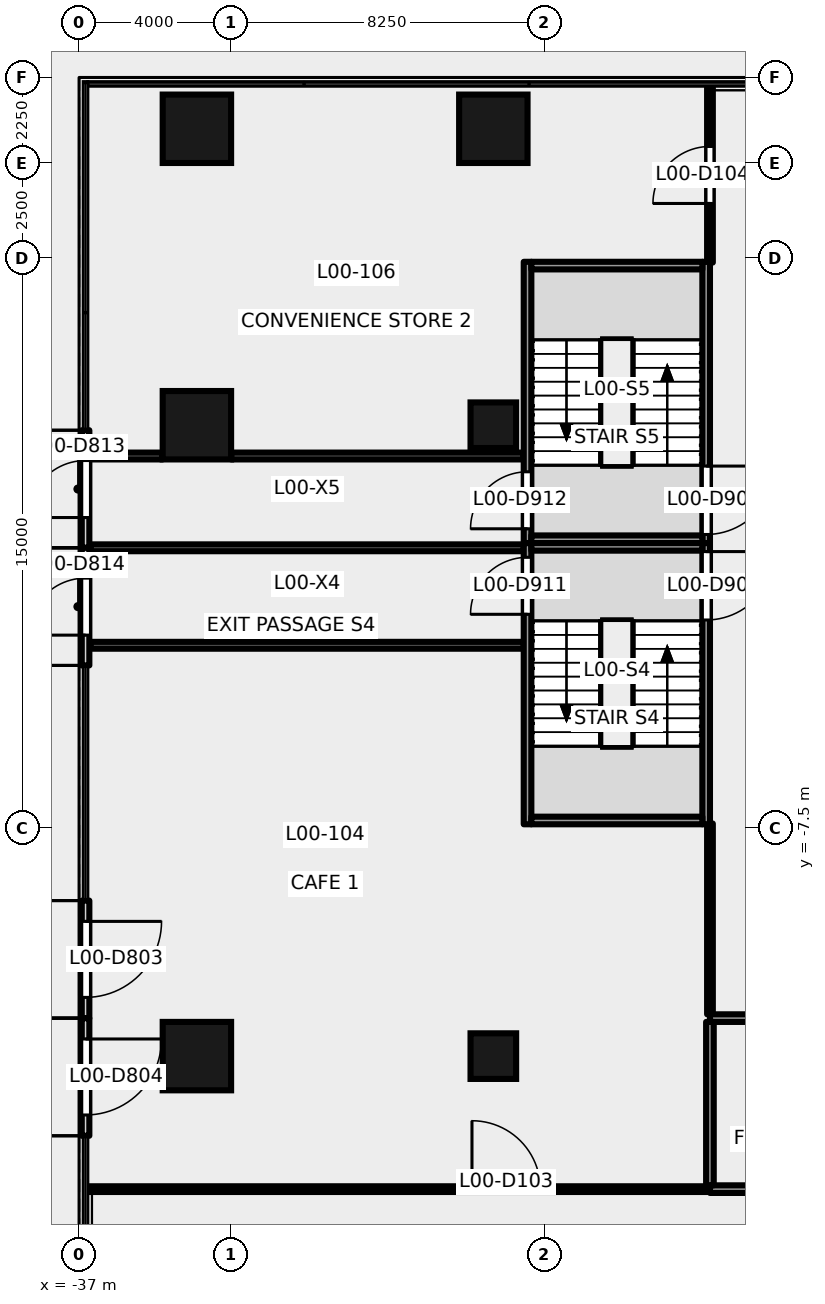
"""IFC4 building model, lengths in metres.
Left out: names, types, materials, properties, quantities, classifications, styles, units other than length and angle.
Written with IfcOpenShell. Run it as: python <this file> out.ifc"""

import sys

from ifc_helpers import new_model, si_unit, direction, frame, frame_2d, origin, origin_2d, place, context, subcontext, project, spatial, rectangle, extrude, element, fill, save


model = new_model("IFC4")
c1 = context("Model", 3, precision=1e-05, world=origin(), true_north=direction((0.0, 1.0)))
c2 = subcontext(c1, "Body", "Model", "MODEL_VIEW")
j1 = project(units=[si_unit("LENGTHUNIT", "METRE"), si_unit("PLANEANGLEUNIT", "RADIAN")], contexts=[c1])
p1 = place(None, origin())
s1 = spatial("IfcSite", under=j1, at=p1, CompositionType="ELEMENT")
p2 = place(p1, origin())
s2 = spatial("IfcBuilding", under=s1, at=p2, CompositionType="ELEMENT")
p3 = place(p2, origin())
s3 = spatial("IfcBuildingStorey", under=s2, at=p3, CompositionType="ELEMENT", Elevation=0.0)
for number, where, z_axis, x_axis in (
    (1, (-33.9, 10.9, -0.2), (0.0, 0.0, 1.0), (1.0, 0.0, 0.0)),
    (2, (-33.9, -13.5, -0.2), (0.0, 0.0, 1.0), (0.0, 1.0, 0.0)),
    (3, (-33.9, 3.1, -0.2), (0.0, 0.0, 1.0), (0.0, 1.0, 0.0)),
    (4, (-26.1, 10.9, -0.2), (0.0, 0.0, 1.0), (1.0, 0.0, 0.0)),
):
    element("IfcColumn", number, at=place(p3, frame(where, z_axis=z_axis, x_axis=x_axis)), inside=s3, PredefinedType="COLUMN", context=c2, shape_type="SweptSolid", body=[
        extrude(rectangle(XDim=1.8, YDim=1.8, at=origin_2d()), origin(), (0.0, 0.0, 1.0), 7.2),
    ])
for number, where, z_axis, x_axis in (
    (5, (-26.1, -13.5, -0.2), (0.0, 0.0, 1.0), (1.0, 0.0, 0.0)),
    (6, (-26.1, 3.1, -0.2), (0.0, 0.0, 1.0), (1.0, 0.0, 0.0)),
):
    element("IfcColumn", number, at=place(p3, frame(where, z_axis=z_axis, x_axis=x_axis)), inside=s3, PredefinedType="COLUMN", context=c2, shape_type="SweptSolid", body=[
        extrude(rectangle(XDim=1.2, YDim=1.2, at=origin_2d()), origin(), (0.0, 0.0, 1.0), 7.2),
    ])
p4 = place(p3, frame((-36.83, -0.126, 0.0), z_axis=(0.0, 0.0, 1.0), x_axis=(0.0, 1.0, 0.0)))
e7 = element("IfcWall", 7, at=p4, inside=s3, PredefinedType="SOLIDWALL", context=c2, shape_type="SweptSolid", body=[
    extrude(rectangle(XDim=3.094, YDim=0.2, at=frame_2d((1.547, 0.0))), origin(), (0.0, 0.0, 1.0), 7.0),
])
p5 = place(p4, frame((0.797, 0.0, 0.0)))
e8 = element("IfcOpeningElement", 8, at=p5, cuts=e7, PredefinedType="OPENING", context=c2, shape_type="SweptSolid", body=[
    extrude(rectangle(XDim=1.5, YDim=2.4, at=frame_2d((0.75, 1.2))), frame((0.0, 0.111, 0.0), z_axis=(0.0, -1.0, 0.0), x_axis=(1.0, 0.0, 0.0)), (0.0, 0.0, 1.0), 0.221),
])
p6 = place(p3, frame((-36.83, -3.22, 0.0), z_axis=(0.0, 0.0, 1.0), x_axis=(0.0, 1.0, 0.0)))
e9 = element("IfcWall", 9, at=p6, inside=s3, PredefinedType="SOLIDWALL", context=c2, shape_type="SweptSolid", body=[
    extrude(rectangle(XDim=3.094, YDim=0.2, at=frame_2d((1.547, 0.0))), origin(), (0.0, 0.0, 1.0), 7.0),
])
p7 = place(p6, frame((0.797, 0.0, 0.0)))
e10 = element("IfcOpeningElement", 10, at=p7, cuts=e9, PredefinedType="OPENING", context=c2, shape_type="SweptSolid", body=[
    extrude(rectangle(XDim=1.5, YDim=2.4, at=frame_2d((0.75, 1.2))), frame((0.0, 0.111, 0.0), z_axis=(0.0, -1.0, 0.0), x_axis=(1.0, 0.0, 0.0)), (0.0, 0.0, 1.0), 0.221),
])
p8 = place(p3, frame((-36.83, -9.408, 0.0), z_axis=(0.0, 0.0, 1.0), x_axis=(0.0, -1.0, 0.0)))
e11 = element("IfcWall", 11, at=p8, inside=s3, PredefinedType="SOLIDWALL", context=c2, shape_type="SweptSolid", body=[
    extrude(rectangle(XDim=3.094, YDim=0.2, at=frame_2d((1.547, 0.0))), origin(), (0.0, 0.0, 1.0), 7.0),
])
p9 = place(p8, frame((0.547, 0.0, 0.0)))
e12 = element("IfcOpeningElement", 12, at=p9, cuts=e11, PredefinedType="OPENING", context=c2, shape_type="SweptSolid", body=[
    extrude(rectangle(XDim=2.0, YDim=2.4, at=frame_2d((1.0, 1.2))), frame((0.0, 0.111, 0.0), z_axis=(0.0, -1.0, 0.0), x_axis=(1.0, 0.0, 0.0)), (0.0, 0.0, 1.0), 0.221),
])
p10 = place(p3, frame((-36.83, -12.502, 0.0), z_axis=(0.0, 0.0, 1.0), x_axis=(0.0, -1.0, 0.0)))
e13 = element("IfcWall", 13, at=p10, inside=s3, PredefinedType="SOLIDWALL", context=c2, shape_type="SweptSolid", body=[
    extrude(rectangle(XDim=3.094, YDim=0.2, at=frame_2d((1.547, 0.0))), origin(), (0.0, 0.0, 1.0), 7.0),
])
p11 = place(p10, frame((0.547, 0.0, 0.0)))
e14 = element("IfcOpeningElement", 14, at=p11, cuts=e13, PredefinedType="OPENING", context=c2, shape_type="SweptSolid", body=[
    extrude(rectangle(XDim=2.0, YDim=2.4, at=frame_2d((1.0, 1.2))), frame((0.0, 0.111, 0.0), z_axis=(0.0, -1.0, 0.0), x_axis=(1.0, 0.0, 0.0)), (0.0, 0.0, 1.0), 0.221),
])
p12 = place(p3, frame((-20.5, 0.0, -0.2), z_axis=(0.0, 0.0, 1.0), x_axis=(0.0, -1.0, 0.0)))
e15 = element("IfcWall", 15, at=p12, inside=s3, PredefinedType="SHEAR", context=c2, shape_type="SweptSolid", body=[
    extrude(rectangle(XDim=7.4, YDim=0.2, at=frame_2d((3.7, 0.0))), origin(), (0.0, 0.0, 1.0), 7.2),
])
p13 = place(p12, frame((0.225, 0.0, 0.2)))
e16 = element("IfcOpeningElement", 16, at=p13, cuts=e15, PredefinedType="OPENING", context=c2, shape_type="SweptSolid", body=[
    extrude(rectangle(XDim=1.8, YDim=2.1, at=frame_2d((0.9, 1.05))), frame((0.0, 0.111, 0.0), z_axis=(0.0, -1.0, 0.0), x_axis=(1.0, 0.0, 0.0)), (0.0, 0.0, 1.0), 0.221),
])
p14 = place(p3, frame((-25.2, -7.4, -0.2), z_axis=(0.0, 0.0, 1.0), x_axis=(0.0, 1.0, 0.0)))
e17 = element("IfcWall", 17, at=p14, inside=s3, PredefinedType="SHEAR", context=c2, shape_type="SweptSolid", body=[
    extrude(rectangle(XDim=7.4, YDim=0.2, at=frame_2d((3.7, 0.0))), origin(), (0.0, 0.0, 1.0), 7.2),
])
p15 = place(p14, frame((5.525, 0.0, 0.2)))
e18 = element("IfcOpeningElement", 18, at=p15, cuts=e17, PredefinedType="OPENING", context=c2, shape_type="SweptSolid", body=[
    extrude(rectangle(XDim=1.5, YDim=2.1, at=frame_2d((0.75, 1.05))), frame((0.0, 0.111, 0.0), z_axis=(0.0, -1.0, 0.0), x_axis=(1.0, 0.0, 0.0)), (0.0, 0.0, 1.0), 0.221),
])
for number, where, z_axis, x_axis in (
    (19, (-25.1, -0.1, -0.2), (0.0, 0.0, 1.0), (1.0, 0.0, 0.0)),
    (20, (-25.1, -7.3, -0.2), (0.0, 0.0, 1.0), (1.0, 0.0, 0.0)),
):
    element("IfcWall", number, at=place(p3, frame(where, z_axis=z_axis, x_axis=x_axis)), inside=s3, PredefinedType="SHEAR", context=c2, shape_type="SweptSolid", body=[
        extrude(rectangle(XDim=4.5, YDim=0.2, at=frame_2d((2.25, 0.0))), origin(), (0.0, 0.0, 1.0), 7.2),
    ])
p16 = place(p3, frame((-20.5, 7.4, -0.2), z_axis=(0.0, 0.0, 1.0), x_axis=(0.0, -1.0, 0.0)))
e21 = element("IfcWall", 21, at=p16, inside=s3, PredefinedType="SHEAR", context=c2, shape_type="SweptSolid", body=[
    extrude(rectangle(XDim=7.4, YDim=0.2, at=frame_2d((3.7, 0.0))), origin(), (0.0, 0.0, 1.0), 7.2),
])
p17 = place(p16, frame((5.375, 0.0, 0.2)))
e22 = element("IfcOpeningElement", 22, at=p17, cuts=e21, PredefinedType="OPENING", context=c2, shape_type="SweptSolid", body=[
    extrude(rectangle(XDim=1.8, YDim=2.1, at=frame_2d((0.9, 1.05))), frame((0.0, 0.111, 0.0), z_axis=(0.0, -1.0, 0.0), x_axis=(1.0, 0.0, 0.0)), (0.0, 0.0, 1.0), 0.221),
])
p18 = place(p3, frame((-25.2, 0.0, -0.2), z_axis=(0.0, 0.0, 1.0), x_axis=(0.0, 1.0, 0.0)))
e23 = element("IfcWall", 23, at=p18, inside=s3, PredefinedType="SHEAR", context=c2, shape_type="SweptSolid", body=[
    extrude(rectangle(XDim=7.4, YDim=0.2, at=frame_2d((3.7, 0.0))), origin(), (0.0, 0.0, 1.0), 7.2),
])
p19 = place(p18, frame((0.375, 0.0, 0.2)))
e24 = element("IfcOpeningElement", 24, at=p19, cuts=e23, PredefinedType="OPENING", context=c2, shape_type="SweptSolid", body=[
    extrude(rectangle(XDim=1.5, YDim=2.1, at=frame_2d((0.75, 1.05))), frame((0.0, 0.111, 0.0), z_axis=(0.0, -1.0, 0.0), x_axis=(1.0, 0.0, 0.0)), (0.0, 0.0, 1.0), 0.221),
])
for number, where, z_axis, x_axis in (
    (25, (-25.1, 7.3, -0.2), (0.0, 0.0, 1.0), (1.0, 0.0, 0.0)),
    (26, (-25.1, 0.1, -0.2), (0.0, 0.0, 1.0), (1.0, 0.0, 0.0)),
):
    element("IfcWall", number, at=place(p3, frame(where, z_axis=z_axis, x_axis=x_axis)), inside=s3, PredefinedType="SHEAR", context=c2, shape_type="SweptSolid", body=[
        extrude(rectangle(XDim=4.5, YDim=0.2, at=frame_2d((2.25, 0.0))), origin(), (0.0, 0.0, 1.0), 7.2),
    ])
for number, where, z_axis, x_axis in (
    (27, (-36.7, -2.69, 0.0), (0.0, 0.0, 1.0), (1.0, 0.0, 0.0)),
    (28, (-36.7, -0.125, 0.0), (0.0, 0.0, 1.0), (1.0, 0.0, 0.0)),
):
    element("IfcWall", number, at=place(p3, frame(where, z_axis=z_axis, x_axis=x_axis)), inside=s3, PredefinedType="PARTITIONING", context=c2, shape_type="SweptSolid", body=[
        extrude(rectangle(XDim=11.4, YDim=0.18, at=frame_2d((5.7, 0.0))), origin(), (0.0, 0.0, 1.0), 7.0),
    ])
p20 = place(p3, frame((-36.7, 2.29, 0.0), z_axis=(0.0, 0.0, 1.0), x_axis=(1.0, 0.0, 0.0)))
e29 = element("IfcWall", 29, at=p20, inside=s3, PredefinedType="PARTITIONING", context=c2, shape_type="SweptSolid", body=[
    extrude(rectangle(XDim=1.9, YDim=0.18, at=frame_2d((0.95, 0.0))), origin(), (0.0, 0.0, 1.0), 7.0),
])
p21 = place(p3, frame((-33.0, 2.29, 0.0), z_axis=(0.0, 0.0, 1.0), x_axis=(1.0, 0.0, 0.0)))
e30 = element("IfcWall", 30, at=p21, inside=s3, PredefinedType="PARTITIONING", context=c2, shape_type="SweptSolid", body=[
    extrude(rectangle(XDim=7.7, YDim=0.18, at=frame_2d((3.85, 0.0))), origin(), (0.0, 0.0, 1.0), 7.0),
])
p22 = place(p3, frame((-15.4, -12.5, 0.0), z_axis=(0.0, 0.0, 1.0), x_axis=(-1.0, 0.0, 0.0)))
e31 = element("IfcWall", 31, at=p22, inside=s3, PredefinedType="PARTITIONING", context=c2, shape_type="SweptSolid", body=[
    extrude(rectangle(XDim=5.0, YDim=0.2, at=frame_2d((2.5, 0.0))), origin(), (0.0, 0.0, 1.0), 6.7),
])
p23 = place(p22, frame((2.05, 0.0, 0.0)))
e32 = element("IfcOpeningElement", 32, at=p23, cuts=e31, PredefinedType="OPENING", context=c2, shape_type="SweptSolid", body=[
    extrude(rectangle(XDim=0.9, YDim=2.1, at=frame_2d((0.45, 1.05))), frame((0.0, 0.111, 0.0), z_axis=(0.0, -1.0, 0.0), x_axis=(1.0, 0.0, 0.0)), (0.0, 0.0, 1.0), 0.221),
])
p24 = place(p3, frame((-20.4, -12.4, 0.0), z_axis=(0.0, 0.0, 1.0), x_axis=(0.0, 1.0, 0.0)))
e33 = element("IfcWall", 33, at=p24, inside=s3, PredefinedType="PARTITIONING", context=c2, shape_type="SweptSolid", body=[
    extrude(rectangle(XDim=5.02, YDim=0.15, at=frame_2d((2.51, 0.0))), origin(), (0.0, 0.0, 1.0), 7.0),
])
p25 = place(p3, frame((-20.4, 7.38, 0.0), z_axis=(0.0, 0.0, 1.0), x_axis=(0.0, 1.0, 0.0)))
e34 = element("IfcWall", 34, at=p25, inside=s3, PredefinedType="PARTITIONING", context=c2, shape_type="SweptSolid", body=[
    extrude(rectangle(XDim=4.61, YDim=0.15, at=frame_2d((2.305, 0.0))), origin(), (0.0, 0.0, 1.0), 6.0),
])
p26 = place(p25, frame((1.555, 0.0, 0.0)))
e35 = element("IfcOpeningElement", 35, at=p26, cuts=e34, PredefinedType="OPENING", context=c2, shape_type="SweptSolid", body=[
    extrude(rectangle(XDim=1.5, YDim=2.1, at=frame_2d((0.75, 1.05))), frame((0.0, 0.085, 0.0), z_axis=(0.0, -1.0, 0.0), x_axis=(1.0, 0.0, 0.0)), (0.0, 0.0, 1.0), 0.171),
])
p27 = place(p3, frame((-15.4, -17.0, 0.0), z_axis=(0.0, 0.0, 1.0), x_axis=(-1.0, 0.0, 0.0)))
e36 = element("IfcWall", 36, at=p27, inside=s3, PredefinedType="PARTITIONING", context=c2, shape_type="SweptSolid", body=[
    extrude(rectangle(XDim=5.0, YDim=0.2, at=frame_2d((2.5, 0.0))), origin(), (0.0, 0.0, 1.0), 6.39),
])
p28 = place(p3, frame((-20.401, -16.9, 0.0), z_axis=(0.0, 0.0, 1.0), x_axis=(0.0, 1.0, 0.0)))
e37 = element("IfcWall", 37, at=p28, inside=s3, PredefinedType="PARTITIONING", context=c2, shape_type="SweptSolid", body=[
    extrude(rectangle(XDim=4.3, YDim=0.2, at=frame_2d((2.15, 0.0))), origin(), (0.0, 0.0, 1.0), 6.0),
])
p29 = place(p3, frame((-36.74, -17.0, 0.0), z_axis=(0.0, 0.0, 1.0), x_axis=(1.0, 0.0, 0.0)))
e38 = element("IfcWall", 38, at=p29, inside=s3, PredefinedType="PARTITIONING", context=c2, shape_type="SweptSolid", body=[
    extrude(rectangle(XDim=16.34, YDim=0.15, at=frame_2d((8.17, 0.0))), origin(), (0.0, 0.0, 1.0), 6.0),
])
p30 = place(p29, frame((10.078, 0.0, 0.0)))
e39 = element("IfcOpeningElement", 39, at=p30, cuts=e38, PredefinedType="OPENING", context=c2, shape_type="SweptSolid", body=[
    extrude(rectangle(XDim=1.8, YDim=2.1, at=frame_2d((0.9, 1.05))), frame((0.0, 0.085, 0.0), z_axis=(0.0, -1.0, 0.0), x_axis=(1.0, 0.0, 0.0)), (0.0, 0.0, 1.0), 0.171),
])
p31 = place(p5, origin())
e40 = element("IfcDoor", 40, at=p31, inside=s3, OperationType="DOUBLE_DOOR_SINGLE_SWING", PredefinedType="DOOR", context=c2, shape_type="SweptSolid", body=[
    extrude(rectangle(XDim=1.5, YDim=2.4, at=frame_2d((0.75, 1.2))), frame((0.0, 0.025, 0.0), z_axis=(0.0, -1.0, 0.0), x_axis=(1.0, 0.0, 0.0)), (0.0, 0.0, 1.0), 0.05),
])
fill(e8, e40)
p32 = place(p7, origin())
e41 = element("IfcDoor", 41, at=p32, inside=s3, OperationType="DOUBLE_DOOR_SINGLE_SWING", PredefinedType="DOOR", context=c2, shape_type="SweptSolid", body=[
    extrude(rectangle(XDim=1.5, YDim=2.4, at=frame_2d((0.75, 1.2))), frame((0.0, 0.025, 0.0), z_axis=(0.0, -1.0, 0.0), x_axis=(1.0, 0.0, 0.0)), (0.0, 0.0, 1.0), 0.05),
])
fill(e10, e41)
p33 = place(p9, origin())
e42 = element("IfcDoor", 42, at=p33, inside=s3, OperationType="DOUBLE_DOOR_SINGLE_SWING", PredefinedType="DOOR", context=c2, shape_type="SweptSolid", body=[
    extrude(rectangle(XDim=2.0, YDim=2.4, at=frame_2d((1.0, 1.2))), frame((0.0, 0.025, 0.0), z_axis=(0.0, -1.0, 0.0), x_axis=(1.0, 0.0, 0.0)), (0.0, 0.0, 1.0), 0.05),
])
fill(e12, e42)
p34 = place(p11, origin())
e43 = element("IfcDoor", 43, at=p34, inside=s3, OperationType="DOUBLE_DOOR_SINGLE_SWING", PredefinedType="DOOR", context=c2, shape_type="SweptSolid", body=[
    extrude(rectangle(XDim=2.0, YDim=2.4, at=frame_2d((1.0, 1.2))), frame((0.0, 0.025, 0.0), z_axis=(0.0, -1.0, 0.0), x_axis=(1.0, 0.0, 0.0)), (0.0, 0.0, 1.0), 0.05),
])
fill(e14, e43)
p35 = place(p13, origin())
e44 = element("IfcDoor", 44, at=p35, inside=s3, OperationType="DOUBLE_DOOR_SINGLE_SWING", PredefinedType="DOOR", context=c2, shape_type="SweptSolid", body=[
    extrude(rectangle(XDim=1.8, YDim=2.1, at=frame_2d((0.9, 1.05))), frame((0.0, 0.025, 0.0), z_axis=(0.0, -1.0, 0.0), x_axis=(1.0, 0.0, 0.0)), (0.0, 0.0, 1.0), 0.05),
])
fill(e16, e44)
p36 = place(p15, origin())
e45 = element("IfcDoor", 45, at=p36, inside=s3, OperationType="DOUBLE_DOOR_SINGLE_SWING", PredefinedType="DOOR", context=c2, shape_type="SweptSolid", body=[
    extrude(rectangle(XDim=1.5, YDim=2.1, at=frame_2d((0.75, 1.05))), frame((0.0, 0.025, 0.0), z_axis=(0.0, -1.0, 0.0), x_axis=(1.0, 0.0, 0.0)), (0.0, 0.0, 1.0), 0.05),
])
fill(e18, e45)
p37 = place(p17, origin())
e46 = element("IfcDoor", 46, at=p37, inside=s3, OperationType="DOUBLE_DOOR_SINGLE_SWING", PredefinedType="DOOR", context=c2, shape_type="SweptSolid", body=[
    extrude(rectangle(XDim=1.8, YDim=2.1, at=frame_2d((0.9, 1.05))), frame((0.0, 0.025, 0.0), z_axis=(0.0, -1.0, 0.0), x_axis=(1.0, 0.0, 0.0)), (0.0, 0.0, 1.0), 0.05),
])
fill(e22, e46)
p38 = place(p19, origin())
e47 = element("IfcDoor", 47, at=p38, inside=s3, OperationType="DOUBLE_DOOR_SINGLE_SWING", PredefinedType="DOOR", context=c2, shape_type="SweptSolid", body=[
    extrude(rectangle(XDim=1.5, YDim=2.1, at=frame_2d((0.75, 1.05))), frame((0.0, 0.025, 0.0), z_axis=(0.0, -1.0, 0.0), x_axis=(1.0, 0.0, 0.0)), (0.0, 0.0, 1.0), 0.05),
])
fill(e24, e47)
p39 = place(p30, origin())
e48 = element("IfcDoor", 48, at=p39, inside=s3, OperationType="DOUBLE_DOOR_SINGLE_SWING", PredefinedType="DOOR", context=c2, shape_type="SweptSolid", body=[
    extrude(rectangle(XDim=1.8, YDim=2.1, at=frame_2d((0.9, 1.05))), frame((0.0, 0.025, 0.0), z_axis=(0.0, -1.0, 0.0), x_axis=(1.0, 0.0, 0.0)), (0.0, 0.0, 1.0), 0.05),
])
fill(e39, e48)
p40 = place(p26, origin())
e49 = element("IfcDoor", 49, at=p40, inside=s3, OperationType="DOUBLE_DOOR_SINGLE_SWING", PredefinedType="DOOR", context=c2, shape_type="SweptSolid", body=[
    extrude(rectangle(XDim=1.5, YDim=2.1, at=frame_2d((0.75, 1.05))), frame((0.0, 0.025, 0.0), z_axis=(0.0, -1.0, 0.0), x_axis=(1.0, 0.0, 0.0)), (0.0, 0.0, 1.0), 0.05),
])
fill(e35, e49)
save(model, sys.argv[1])
